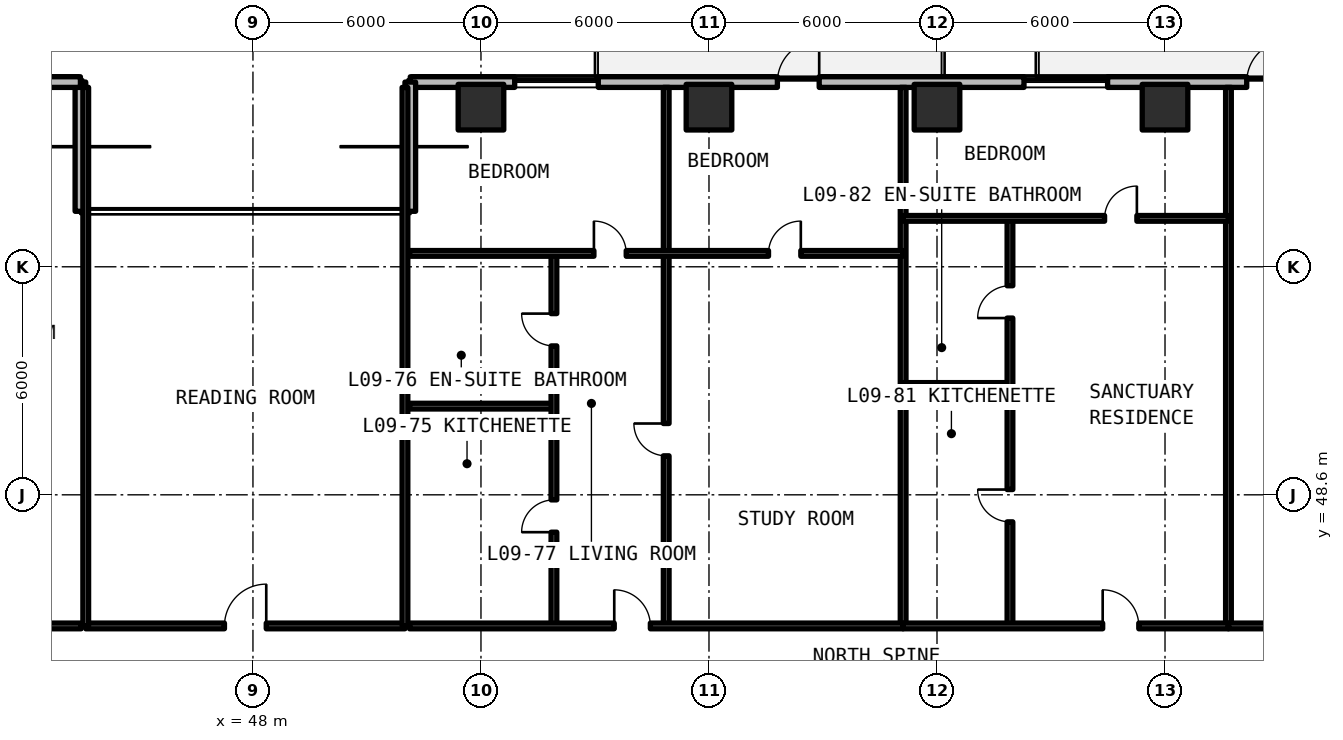
"""IFC4 building model, lengths in metres.
Left out: names, types, materials, properties, quantities, classifications, styles, units other than length and angle.
Written with IfcOpenShell. Run it as: python <this file> out.ifc"""

import sys

from ifc_helpers import new_model, si_unit, direction, frame, frame_2d, origin, origin_2d, place, context, subcontext, project, spatial, rectangle, extrude, element, fill, save


model = new_model("IFC4")
c1 = context("Model", 3, precision=1e-05, world=origin(), true_north=direction((0.0, 1.0)))
c2 = subcontext(c1, "Body", "Model", "MODEL_VIEW")
j1 = project(units=[si_unit("LENGTHUNIT", "METRE"), si_unit("PLANEANGLEUNIT", "RADIAN")], contexts=[c1])
p1 = place(None, origin())
s1 = spatial("IfcSite", under=j1, at=p1, CompositionType="ELEMENT")
p2 = place(p1, origin())
s2 = spatial("IfcBuilding", under=s1, at=p2, CompositionType="ELEMENT")
p3 = place(p2, frame((0.0, 0.0, 35.64)))
s3 = spatial("IfcBuildingStorey", under=s2, at=p3, CompositionType="ELEMENT", Elevation=35.64)
for number, where, z_axis, x_axis in (
    (1, (54.0, 58.8, 0.0), (0.0, 0.0, 1.0), (1.0, 0.0, 0.0)),
    (2, (60.0, 58.8, 0.0), (0.0, 0.0, 1.0), (1.0, 0.0, 0.0)),
    (3, (66.0, 58.8, 0.0), (0.0, 0.0, 1.0), (1.0, 0.0, 0.0)),
    (4, (72.0, 58.8, 0.0), (0.0, 0.0, 1.0), (1.0, 0.0, 0.0)),
):
    element("IfcColumn", number, at=place(p3, frame(where, z_axis=z_axis, x_axis=x_axis)), inside=s3, PredefinedType="COLUMN", context=c2, shape_type="SweptSolid", body=[
        extrude(rectangle(XDim=1.2, YDim=1.2, at=origin_2d()), origin(), (0.0, 0.0, 1.0), 3.3),
    ])
p4 = place(p3, frame((96.542, 59.46, 0.0), z_axis=(0.0, 0.0, 1.0), x_axis=(-1.0, 0.0, 0.0)))
e5 = element("IfcWall", 5, at=p4, inside=s3, PredefinedType="SOLIDWALL", context=c2, shape_type="SweptSolid", body=[
    extrude(rectangle(XDim=44.402, YDim=0.28, at=frame_2d((22.201, 0.0))), origin(), (0.0, 0.0, 1.0), 3.08),
])
p5 = place(p4, frame((33.642, 0.0, 0.0)))
e6 = element("IfcOpeningElement", 6, at=p5, cuts=e5, PredefinedType="OPENING", context=c2, shape_type="SweptSolid", body=[
    extrude(rectangle(XDim=1.1, YDim=2.15, at=frame_2d((0.55, 1.075))), frame((0.0, 0.15, 0.0), z_axis=(0.0, -1.0, 0.0), x_axis=(1.0, 0.0, 0.0)), (0.0, 0.0, 1.0), 0.3),
])
p6 = place(p4, frame((21.292, 0.0, 0.0)))
e7 = element("IfcOpeningElement", 7, at=p6, cuts=e5, PredefinedType="OPENING", context=c2, shape_type="SweptSolid", body=[
    extrude(rectangle(XDim=1.1, YDim=2.15, at=frame_2d((0.55, 1.075))), frame((0.0, 0.15, 0.0), z_axis=(0.0, -1.0, 0.0), x_axis=(1.0, 0.0, 0.0)), (0.0, 0.0, 1.0), 0.3),
])
p7 = place(p4, frame((9.692, 0.0, 0.0)))
e8 = element("IfcOpeningElement", 8, at=p7, cuts=e5, PredefinedType="OPENING", context=c2, shape_type="SweptSolid", body=[
    extrude(rectangle(XDim=1.1, YDim=2.15, at=frame_2d((0.55, 1.075))), frame((0.0, 0.15, 0.0), z_axis=(0.0, -1.0, 0.0), x_axis=(1.0, 0.0, 0.0)), (0.0, 0.0, 1.0), 0.3),
])
p8 = place(p4, frame((39.455, 0.0, 0.78)))
e9 = element("IfcOpeningElement", 9, at=p8, cuts=e5, PredefinedType="OPENING", context=c2, shape_type="SweptSolid", body=[
    extrude(rectangle(XDim=2.2, YDim=1.66, at=frame_2d((1.1, 0.83))), frame((0.0, 0.15, 0.0), z_axis=(0.0, -1.0, 0.0), x_axis=(1.0, 0.0, 0.0)), (0.0, 0.0, 1.0), 0.3),
])
p9 = place(p4, frame((26.053, 0.0, 0.78)))
e10 = element("IfcOpeningElement", 10, at=p9, cuts=e5, PredefinedType="OPENING", context=c2, shape_type="SweptSolid", body=[
    extrude(rectangle(XDim=2.2, YDim=1.66, at=frame_2d((1.1, 0.83))), frame((0.0, 0.15, 0.0), z_axis=(0.0, -1.0, 0.0), x_axis=(1.0, 0.0, 0.0)), (0.0, 0.0, 1.0), 0.3),
])
p10 = place(p4, frame((2.098, 0.0, 0.78)))
e11 = element("IfcOpeningElement", 11, at=p10, cuts=e5, PredefinedType="OPENING", context=c2, shape_type="SweptSolid", body=[
    extrude(rectangle(XDim=2.2, YDim=1.66, at=frame_2d((1.1, 0.83))), frame((0.0, 0.15, 0.0), z_axis=(0.0, -1.0, 0.0), x_axis=(1.0, 0.0, 0.0)), (0.0, 0.0, 1.0), 0.3),
])
for number, where, z_axis, x_axis in (
    (12, (52.14, 59.46, 0.0), (0.0, 0.0, 1.0), (0.0, -1.0, 0.0)),
    (13, (43.46, 56.06, 0.0), (0.0, 0.0, 1.0), (0.0, 1.0, 0.0)),
):
    element("IfcWall", number, at=place(p3, frame(where, z_axis=z_axis, x_axis=x_axis)), inside=s3, PredefinedType="SOLIDWALL", context=c2, shape_type="SweptSolid", body=[
        extrude(rectangle(XDim=3.4, YDim=0.28, at=frame_2d((1.7, 0.0))), origin(), (0.0, 0.0, 1.0), 3.08),
    ])
p11 = place(p3, frame((43.46, 59.46, 0.0), z_axis=(0.0, 0.0, 1.0), x_axis=(-1.0, 0.0, 0.0)))
e14 = element("IfcWall", 14, at=p11, inside=s3, PredefinedType="SOLIDWALL", context=c2, shape_type="SweptSolid", body=[
    extrude(rectangle(XDim=22.602, YDim=0.28, at=frame_2d((11.301, 0.0))), origin(), (0.0, 0.0, 1.0), 3.08),
])
p12 = place(p11, frame((16.11, 0.0, 0.0)))
e15 = element("IfcOpeningElement", 15, at=p12, cuts=e14, PredefinedType="OPENING", context=c2, shape_type="SweptSolid", body=[
    extrude(rectangle(XDim=1.1, YDim=2.15, at=frame_2d((0.55, 1.075))), frame((0.0, 0.15, 0.0), z_axis=(0.0, -1.0, 0.0), x_axis=(1.0, 0.0, 0.0)), (0.0, 0.0, 1.0), 0.3),
])
p13 = place(p11, frame((20.221, 0.0, 0.78)))
e16 = element("IfcOpeningElement", 16, at=p13, cuts=e14, PredefinedType="OPENING", context=c2, shape_type="SweptSolid", body=[
    extrude(rectangle(XDim=1.4, YDim=1.65, at=frame_2d((0.7, 0.825))), frame((0.0, 0.15, 0.0), z_axis=(0.0, -1.0, 0.0), x_axis=(1.0, 0.0, 0.0)), (0.0, 0.0, 1.0), 0.3),
])
p14 = place(p11, frame((9.471, 0.0, 0.78)))
e17 = element("IfcOpeningElement", 17, at=p14, cuts=e14, PredefinedType="OPENING", context=c2, shape_type="SweptSolid", body=[
    extrude(rectangle(XDim=2.2, YDim=1.66, at=frame_2d((1.1, 0.83))), frame((0.0, 0.15, 0.0), z_axis=(0.0, -1.0, 0.0), x_axis=(1.0, 0.0, 0.0)), (0.0, 0.0, 1.0), 0.3),
])
p15 = place(p11, frame((5.193, 0.0, 0.78)))
e18 = element("IfcOpeningElement", 18, at=p15, cuts=e14, PredefinedType="OPENING", context=c2, shape_type="SweptSolid", body=[
    extrude(rectangle(XDim=1.4, YDim=1.65, at=frame_2d((0.7, 0.825))), frame((0.0, 0.15, 0.0), z_axis=(0.0, -1.0, 0.0), x_axis=(1.0, 0.0, 0.0)), (0.0, 0.0, 1.0), 0.3),
])
p16 = place(p11, frame((2.26, 0.0, 0.78)))
e19 = element("IfcOpeningElement", 19, at=p16, cuts=e14, PredefinedType="OPENING", context=c2, shape_type="SweptSolid", body=[
    extrude(rectangle(XDim=1.4, YDim=1.65, at=frame_2d((0.7, 0.825))), frame((0.0, 0.15, 0.0), z_axis=(0.0, -1.0, 0.0), x_axis=(1.0, 0.0, 0.0)), (0.0, 0.0, 1.0), 0.3),
])
p17 = place(p3, frame((43.6, 45.15, 0.0), z_axis=(0.0, 0.0, 1.0), x_axis=(1.0, 0.0, 0.0)))
e20 = element("IfcWall", 20, at=p17, inside=s3, PredefinedType="SOLIDWALL", context=c2, shape_type="SweptSolid", body=[
    extrude(rectangle(XDim=8.4, YDim=0.15, at=frame_2d((4.2, 0.0))), origin(), (0.0, 0.0, 1.0), 2.35),
])
p18 = place(p17, frame((3.65, 0.0, 0.0)))
e21 = element("IfcOpeningElement", 21, at=p18, cuts=e20, PredefinedType="OPENING", context=c2, shape_type="SweptSolid", body=[
    extrude(rectangle(XDim=1.1, YDim=2.15, at=frame_2d((0.55, 1.075))), frame((0.0, 0.085, 0.0), z_axis=(0.0, -1.0, 0.0), x_axis=(1.0, 0.0, 0.0)), (0.0, 0.0, 1.0), 0.17),
])
for number, where, z_axis, x_axis in (
    (22, (43.6, 45.15, 0.0), (0.0, 0.0, 1.0), (0.0, 1.0, 0.0)),
    (23, (52.0, 45.15, 0.0), (0.0, 0.0, 1.0), (0.0, 1.0, 0.0)),
):
    element("IfcWall", number, at=place(p3, frame(where, z_axis=z_axis, x_axis=x_axis)), inside=s3, PredefinedType="SOLIDWALL", context=c2, shape_type="SweptSolid", body=[
        extrude(rectangle(XDim=14.17, YDim=0.15, at=frame_2d((7.085, 0.0))), origin(), (0.0, 0.0, 1.0), 2.35),
    ])
p19 = place(p3, frame((39.121, 45.15, 0.0), z_axis=(0.0, 0.0, 1.0), x_axis=(1.0, 0.0, 0.0)))
e24 = element("IfcWall", 24, at=p19, inside=s3, PredefinedType="SOLIDWALL", context=c2, shape_type="SweptSolid", body=[
    extrude(rectangle(XDim=4.359, YDim=0.15, at=frame_2d((2.179, 0.0))), origin(), (0.0, 0.0, 1.0), 2.35),
])
p20 = place(p19, frame((1.704, 0.0, 0.0)))
e25 = element("IfcOpeningElement", 25, at=p20, cuts=e24, PredefinedType="OPENING", context=c2, shape_type="SweptSolid", body=[
    extrude(rectangle(XDim=0.95, YDim=2.15, at=frame_2d((0.475, 1.075))), frame((0.0, 0.085, 0.0), z_axis=(0.0, -1.0, 0.0), x_axis=(1.0, 0.0, 0.0)), (0.0, 0.0, 1.0), 0.17),
])
p21 = place(p3, frame((65.109, 45.15, 0.0), z_axis=(0.0, 0.0, 1.0), x_axis=(0.0, 1.0, 0.0)))
e26 = element("IfcWall", 26, at=p21, inside=s3, PredefinedType="SOLIDWALL", context=c2, shape_type="SweptSolid", body=[
    extrude(rectangle(XDim=14.17, YDim=0.15, at=frame_2d((7.085, 0.0))), origin(), (0.0, 0.0, 1.0), 2.35),
])
p22 = place(p3, frame((58.874, 45.15, 0.0), z_axis=(0.0, 0.0, 1.0), x_axis=(0.0, 1.0, 0.0)))
e27 = element("IfcWall", 27, at=p22, inside=s3, PredefinedType="PARTITIONING", context=c2, shape_type="SweptSolid", body=[
    extrude(rectangle(XDim=9.802, YDim=0.15, at=frame_2d((4.901, 0.0))), origin(), (0.0, 0.0, 1.0), 2.35),
])
p23 = place(p22, frame((4.476, 0.0, 0.0)))
e28 = element("IfcOpeningElement", 28, at=p23, cuts=e27, PredefinedType="OPENING", context=c2, shape_type="SweptSolid", body=[
    extrude(rectangle(XDim=0.85, YDim=2.1, at=frame_2d((0.425, 1.05))), frame((0.0, 0.085, 0.0), z_axis=(0.0, -1.0, 0.0), x_axis=(1.0, 0.0, 0.0)), (0.0, 0.0, 1.0), 0.17),
])
p24 = place(p3, frame((52.12, 50.933, 0.0), z_axis=(0.0, 0.0, 1.0), x_axis=(1.0, 0.0, 0.0)))
e29 = element("IfcWall", 29, at=p24, inside=s3, PredefinedType="PARTITIONING", context=c2, shape_type="SweptSolid", body=[
    extrude(rectangle(XDim=3.8, YDim=0.15, at=frame_2d((1.9, 0.0))), origin(), (0.0, 0.0, 1.0), 2.35),
])
p25 = place(p3, frame((55.92, 45.15, 0.0), z_axis=(0.0, 0.0, 1.0), x_axis=(0.0, 1.0, 0.0)))
e30 = element("IfcWall", 30, at=p25, inside=s3, PredefinedType="PARTITIONING", context=c2, shape_type="SweptSolid", body=[
    extrude(rectangle(XDim=9.802, YDim=0.15, at=frame_2d((4.901, 0.0))), origin(), (0.0, 0.0, 1.0), 2.35),
])
p26 = place(p25, frame((2.467, 0.0, 0.0)))
e31 = element("IfcOpeningElement", 31, at=p26, cuts=e30, PredefinedType="OPENING", context=c2, shape_type="SweptSolid", body=[
    extrude(rectangle(XDim=0.85, YDim=2.1, at=frame_2d((0.425, 1.05))), frame((0.0, 0.085, 0.0), z_axis=(0.0, -1.0, 0.0), x_axis=(1.0, 0.0, 0.0)), (0.0, 0.0, 1.0), 0.17),
])
p27 = place(p25, frame((7.368, 0.0, 0.0)))
e32 = element("IfcOpeningElement", 32, at=p27, cuts=e30, PredefinedType="OPENING", context=c2, shape_type="SweptSolid", body=[
    extrude(rectangle(XDim=0.85, YDim=2.1, at=frame_2d((0.425, 1.05))), frame((0.0, 0.085, 0.0), z_axis=(0.0, -1.0, 0.0), x_axis=(1.0, 0.0, 0.0)), (0.0, 0.0, 1.0), 0.17),
])
p28 = place(p3, frame((58.874, 54.952, 0.0), z_axis=(0.0, 0.0, 1.0), x_axis=(0.0, 1.0, 0.0)))
e33 = element("IfcWall", 33, at=p28, inside=s3, PredefinedType="PARTITIONING", context=c2, shape_type="SweptSolid", body=[
    extrude(rectangle(XDim=4.368, YDim=0.15, at=frame_2d((2.184, 0.0))), origin(), (0.0, 0.0, 1.0), 2.35),
])
p29 = place(p3, frame((52.12, 54.952, 0.0), z_axis=(0.0, 0.0, 1.0), x_axis=(1.0, 0.0, 0.0)))
e34 = element("IfcWall", 34, at=p29, inside=s3, PredefinedType="PARTITIONING", context=c2, shape_type="SweptSolid", body=[
    extrude(rectangle(XDim=12.989, YDim=0.15, at=frame_2d((6.494, 0.0))), origin(), (0.0, 0.0, 1.0), 2.35),
])
p30 = place(p29, frame((4.852, 0.0, 0.0)))
e35 = element("IfcOpeningElement", 35, at=p30, cuts=e34, PredefinedType="OPENING", context=c2, shape_type="SweptSolid", body=[
    extrude(rectangle(XDim=0.85, YDim=2.1, at=frame_2d((0.425, 1.05))), frame((0.0, 0.085, 0.0), z_axis=(0.0, -1.0, 0.0), x_axis=(1.0, 0.0, 0.0)), (0.0, 0.0, 1.0), 0.17),
])
p31 = place(p29, frame((9.447, 0.0, 0.0)))
e36 = element("IfcOpeningElement", 36, at=p31, cuts=e34, PredefinedType="OPENING", context=c2, shape_type="SweptSolid", body=[
    extrude(rectangle(XDim=0.85, YDim=2.1, at=frame_2d((0.425, 1.05))), frame((0.0, 0.085, 0.0), z_axis=(0.0, -1.0, 0.0), x_axis=(1.0, 0.0, 0.0)), (0.0, 0.0, 1.0), 0.17),
])
p32 = place(p3, frame((52.12, 45.15, 0.0), z_axis=(0.0, 0.0, 1.0), x_axis=(1.0, 0.0, 0.0)))
e37 = element("IfcWall", 37, at=p32, inside=s3, PredefinedType="SOLIDWALL", context=c2, shape_type="SweptSolid", body=[
    extrude(rectangle(XDim=12.989, YDim=0.15, at=frame_2d((6.494, 0.0))), origin(), (0.0, 0.0, 1.0), 2.35),
])
p33 = place(p32, frame((5.387, 0.0, 0.0)))
e38 = element("IfcOpeningElement", 38, at=p33, cuts=e37, PredefinedType="OPENING", context=c2, shape_type="SweptSolid", body=[
    extrude(rectangle(XDim=0.95, YDim=2.15, at=frame_2d((0.475, 1.075))), frame((0.0, 0.085, 0.0), z_axis=(0.0, -1.0, 0.0), x_axis=(1.0, 0.0, 0.0)), (0.0, 0.0, 1.0), 0.17),
])
p34 = place(p3, frame((73.67, 45.15, 0.0), z_axis=(0.0, 0.0, 1.0), x_axis=(0.0, 1.0, 0.0)))
e39 = element("IfcWall", 39, at=p34, inside=s3, PredefinedType="SOLIDWALL", context=c2, shape_type="SweptSolid", body=[
    extrude(rectangle(XDim=14.17, YDim=0.15, at=frame_2d((7.085, 0.0))), origin(), (0.0, 0.0, 1.0), 2.35),
])
p35 = place(p3, frame((65.109, 51.477, 0.0), z_axis=(0.0, 0.0, 1.0), x_axis=(1.0, 0.0, 0.0)))
e40 = element("IfcWall", 40, at=p35, inside=s3, PredefinedType="PARTITIONING", context=c2, shape_type="SweptSolid", body=[
    extrude(rectangle(XDim=2.811, YDim=0.15, at=frame_2d((1.406, 0.0))), origin(), (0.0, 0.0, 1.0), 2.35),
])
p36 = place(p3, frame((67.92, 45.15, 0.0), z_axis=(0.0, 0.0, 1.0), x_axis=(0.0, 1.0, 0.0)))
e41 = element("IfcWall", 41, at=p36, inside=s3, PredefinedType="PARTITIONING", context=c2, shape_type="SweptSolid", body=[
    extrude(rectangle(XDim=10.724, YDim=0.15, at=frame_2d((5.362, 0.0))), origin(), (0.0, 0.0, 1.0), 2.35),
])
p37 = place(p36, frame((2.739, 0.0, 0.0)))
e42 = element("IfcOpeningElement", 42, at=p37, cuts=e41, PredefinedType="OPENING", context=c2, shape_type="SweptSolid", body=[
    extrude(rectangle(XDim=0.85, YDim=2.1, at=frame_2d((0.425, 1.05))), frame((0.0, 0.085, 0.0), z_axis=(0.0, -1.0, 0.0), x_axis=(1.0, 0.0, 0.0)), (0.0, 0.0, 1.0), 0.17),
])
p38 = place(p36, frame((8.101, 0.0, 0.0)))
e43 = element("IfcOpeningElement", 43, at=p38, cuts=e41, PredefinedType="OPENING", context=c2, shape_type="SweptSolid", body=[
    extrude(rectangle(XDim=0.85, YDim=2.1, at=frame_2d((0.425, 1.05))), frame((0.0, 0.085, 0.0), z_axis=(0.0, -1.0, 0.0), x_axis=(1.0, 0.0, 0.0)), (0.0, 0.0, 1.0), 0.17),
])
p39 = place(p3, frame((65.109, 55.874, 0.0), z_axis=(0.0, 0.0, 1.0), x_axis=(1.0, 0.0, 0.0)))
e44 = element("IfcWall", 44, at=p39, inside=s3, PredefinedType="PARTITIONING", context=c2, shape_type="SweptSolid", body=[
    extrude(rectangle(XDim=8.561, YDim=0.15, at=frame_2d((4.28, 0.0))), origin(), (0.0, 0.0, 1.0), 2.35),
])
p40 = place(p39, frame((5.301, 0.0, 0.0)))
e45 = element("IfcOpeningElement", 45, at=p40, cuts=e44, PredefinedType="OPENING", context=c2, shape_type="SweptSolid", body=[
    extrude(rectangle(XDim=0.85, YDim=2.1, at=frame_2d((0.425, 1.05))), frame((0.0, 0.085, 0.0), z_axis=(0.0, -1.0, 0.0), x_axis=(1.0, 0.0, 0.0)), (0.0, 0.0, 1.0), 0.17),
])
p41 = place(p3, frame((65.109, 45.15, 0.0), z_axis=(0.0, 0.0, 1.0), x_axis=(1.0, 0.0, 0.0)))
e46 = element("IfcWall", 46, at=p41, inside=s3, PredefinedType="SOLIDWALL", context=c2, shape_type="SweptSolid", body=[
    extrude(rectangle(XDim=8.561, YDim=0.15, at=frame_2d((4.28, 0.0))), origin(), (0.0, 0.0, 1.0), 2.35),
])
p42 = place(p41, frame((5.251, 0.0, 0.0)))
e47 = element("IfcOpeningElement", 47, at=p42, cuts=e46, PredefinedType="OPENING", context=c2, shape_type="SweptSolid", body=[
    extrude(rectangle(XDim=0.95, YDim=2.15, at=frame_2d((0.475, 1.075))), frame((0.0, 0.085, 0.0), z_axis=(0.0, -1.0, 0.0), x_axis=(1.0, 0.0, 0.0)), (0.0, 0.0, 1.0), 0.17),
])
p43 = place(p3, frame((73.67, 45.15, 0.0), z_axis=(0.0, 0.0, 1.0), x_axis=(1.0, 0.0, 0.0)))
e48 = element("IfcWall", 48, at=p43, inside=s3, PredefinedType="SOLIDWALL", context=c2, shape_type="SweptSolid", body=[
    extrude(rectangle(XDim=10.037, YDim=0.15, at=frame_2d((5.018, 0.0))), origin(), (0.0, 0.0, 1.0), 2.35),
])
p44 = place(p43, frame((4.469, 0.0, 0.0)))
e49 = element("IfcOpeningElement", 49, at=p44, cuts=e48, PredefinedType="OPENING", context=c2, shape_type="SweptSolid", body=[
    extrude(rectangle(XDim=1.1, YDim=2.15, at=frame_2d((0.55, 1.075))), frame((0.0, 0.085, 0.0), z_axis=(0.0, -1.0, 0.0), x_axis=(1.0, 0.0, 0.0)), (0.0, 0.0, 1.0), 0.17),
])
p45 = place(p5, frame((1.1, 0.0, 0.0), z_axis=(0.0, 0.0, 1.0), x_axis=(-1.0, 0.0, 0.0)))
e50 = element("IfcDoor", 50, at=p45, inside=s3, OperationType="SINGLE_SWING_LEFT", PredefinedType="DOOR", context=c2, shape_type="SweptSolid", body=[
    extrude(rectangle(XDim=1.1, YDim=2.15, at=frame_2d((0.55, 1.075))), frame((0.0, 0.025, 0.0), z_axis=(0.0, -1.0, 0.0), x_axis=(1.0, 0.0, 0.0)), (0.0, 0.0, 1.0), 0.05),
])
fill(e6, e50)
p46 = place(p6, frame((1.1, 0.0, 0.0), z_axis=(0.0, 0.0, 1.0), x_axis=(-1.0, 0.0, 0.0)))
e51 = element("IfcDoor", 51, at=p46, inside=s3, OperationType="SINGLE_SWING_RIGHT", PredefinedType="DOOR", context=c2, shape_type="SweptSolid", body=[
    extrude(rectangle(XDim=1.1, YDim=2.15, at=frame_2d((0.55, 1.075))), frame((0.0, 0.025, 0.0), z_axis=(0.0, -1.0, 0.0), x_axis=(1.0, 0.0, 0.0)), (0.0, 0.0, 1.0), 0.05),
])
fill(e7, e51)
p47 = place(p8, origin())
e52 = element("IfcWindow", 52, at=p47, inside=s3, PartitioningType="SINGLE_PANEL", PredefinedType="WINDOW", context=c2, shape_type="SweptSolid", body=[
    extrude(rectangle(XDim=2.2, YDim=1.66, at=frame_2d((1.1, 0.83))), frame((0.0, 0.03, 0.0), z_axis=(0.0, -1.0, 0.0), x_axis=(1.0, 0.0, 0.0)), (0.0, 0.0, 1.0), 0.06),
])
fill(e9, e52)
p48 = place(p9, origin())
e53 = element("IfcWindow", 53, at=p48, inside=s3, PartitioningType="SINGLE_PANEL", PredefinedType="WINDOW", context=c2, shape_type="SweptSolid", body=[
    extrude(rectangle(XDim=2.2, YDim=1.66, at=frame_2d((1.1, 0.83))), frame((0.0, 0.03, 0.0), z_axis=(0.0, -1.0, 0.0), x_axis=(1.0, 0.0, 0.0)), (0.0, 0.0, 1.0), 0.06),
])
fill(e10, e53)
p49 = place(p18, origin())
e54 = element("IfcDoor", 54, at=p49, inside=s3, OperationType="SINGLE_SWING_RIGHT", PredefinedType="DOOR", context=c2, shape_type="SweptSolid", body=[
    extrude(rectangle(XDim=1.1, YDim=2.15, at=frame_2d((0.55, 1.075))), frame((0.0, 0.025, 0.0), z_axis=(0.0, -1.0, 0.0), x_axis=(1.0, 0.0, 0.0)), (0.0, 0.0, 1.0), 0.05),
])
fill(e21, e54)
p50 = place(p23, origin())
e55 = element("IfcDoor", 55, at=p50, inside=s3, OperationType="SINGLE_SWING_RIGHT", PredefinedType="DOOR", context=c2, shape_type="SweptSolid", body=[
    extrude(rectangle(XDim=0.85, YDim=2.1, at=frame_2d((0.425, 1.05))), frame((0.0, 0.025, 0.0), z_axis=(0.0, -1.0, 0.0), x_axis=(1.0, 0.0, 0.0)), (0.0, 0.0, 1.0), 0.05),
])
fill(e28, e55)
p51 = place(p26, origin())
e56 = element("IfcDoor", 56, at=p51, inside=s3, OperationType="SINGLE_SWING_LEFT", PredefinedType="DOOR", context=c2, shape_type="SweptSolid", body=[
    extrude(rectangle(XDim=0.85, YDim=2.1, at=frame_2d((0.425, 1.05))), frame((0.0, 0.025, 0.0), z_axis=(0.0, -1.0, 0.0), x_axis=(1.0, 0.0, 0.0)), (0.0, 0.0, 1.0), 0.05),
])
fill(e31, e56)
p52 = place(p27, origin())
e57 = element("IfcDoor", 57, at=p52, inside=s3, OperationType="SINGLE_SWING_RIGHT", PredefinedType="DOOR", context=c2, shape_type="SweptSolid", body=[
    extrude(rectangle(XDim=0.85, YDim=2.1, at=frame_2d((0.425, 1.05))), frame((0.0, 0.025, 0.0), z_axis=(0.0, -1.0, 0.0), x_axis=(1.0, 0.0, 0.0)), (0.0, 0.0, 1.0), 0.05),
])
fill(e32, e57)
p53 = place(p30, origin())
e58 = element("IfcDoor", 58, at=p53, inside=s3, OperationType="SINGLE_SWING_LEFT", PredefinedType="DOOR", context=c2, shape_type="SweptSolid", body=[
    extrude(rectangle(XDim=0.85, YDim=2.1, at=frame_2d((0.425, 1.05))), frame((0.0, 0.025, 0.0), z_axis=(0.0, -1.0, 0.0), x_axis=(1.0, 0.0, 0.0)), (0.0, 0.0, 1.0), 0.05),
])
fill(e35, e58)
p54 = place(p31, origin())
e59 = element("IfcDoor", 59, at=p54, inside=s3, OperationType="SINGLE_SWING_RIGHT", PredefinedType="DOOR", context=c2, shape_type="SweptSolid", body=[
    extrude(rectangle(XDim=0.85, YDim=2.1, at=frame_2d((0.425, 1.05))), frame((0.0, 0.025, 0.0), z_axis=(0.0, -1.0, 0.0), x_axis=(1.0, 0.0, 0.0)), (0.0, 0.0, 1.0), 0.05),
])
fill(e36, e59)
p55 = place(p33, origin())
e60 = element("IfcDoor", 60, at=p55, inside=s3, OperationType="SINGLE_SWING_LEFT", PredefinedType="DOOR", context=c2, shape_type="SweptSolid", body=[
    extrude(rectangle(XDim=0.95, YDim=2.15, at=frame_2d((0.475, 1.075))), frame((0.0, 0.025, 0.0), z_axis=(0.0, -1.0, 0.0), x_axis=(1.0, 0.0, 0.0)), (0.0, 0.0, 1.0), 0.05),
])
fill(e38, e60)
p56 = place(p37, origin())
e61 = element("IfcDoor", 61, at=p56, inside=s3, OperationType="SINGLE_SWING_RIGHT", PredefinedType="DOOR", context=c2, shape_type="SweptSolid", body=[
    extrude(rectangle(XDim=0.85, YDim=2.1, at=frame_2d((0.425, 1.05))), frame((0.0, 0.025, 0.0), z_axis=(0.0, -1.0, 0.0), x_axis=(1.0, 0.0, 0.0)), (0.0, 0.0, 1.0), 0.05),
])
fill(e42, e61)
p57 = place(p38, origin())
e62 = element("IfcDoor", 62, at=p57, inside=s3, OperationType="SINGLE_SWING_LEFT", PredefinedType="DOOR", context=c2, shape_type="SweptSolid", body=[
    extrude(rectangle(XDim=0.85, YDim=2.1, at=frame_2d((0.425, 1.05))), frame((0.0, 0.025, 0.0), z_axis=(0.0, -1.0, 0.0), x_axis=(1.0, 0.0, 0.0)), (0.0, 0.0, 1.0), 0.05),
])
fill(e43, e62)
p58 = place(p40, origin())
e63 = element("IfcDoor", 63, at=p58, inside=s3, OperationType="SINGLE_SWING_RIGHT", PredefinedType="DOOR", context=c2, shape_type="SweptSolid", body=[
    extrude(rectangle(XDim=0.85, YDim=2.1, at=frame_2d((0.425, 1.05))), frame((0.0, 0.025, 0.0), z_axis=(0.0, -1.0, 0.0), x_axis=(1.0, 0.0, 0.0)), (0.0, 0.0, 1.0), 0.05),
])
fill(e45, e63)
p59 = place(p42, origin())
e64 = element("IfcDoor", 64, at=p59, inside=s3, OperationType="SINGLE_SWING_LEFT", PredefinedType="DOOR", context=c2, shape_type="SweptSolid", body=[
    extrude(rectangle(XDim=0.95, YDim=2.15, at=frame_2d((0.475, 1.075))), frame((0.0, 0.025, 0.0), z_axis=(0.0, -1.0, 0.0), x_axis=(1.0, 0.0, 0.0)), (0.0, 0.0, 1.0), 0.05),
])
fill(e47, e64)
save(model, sys.argv[1])
